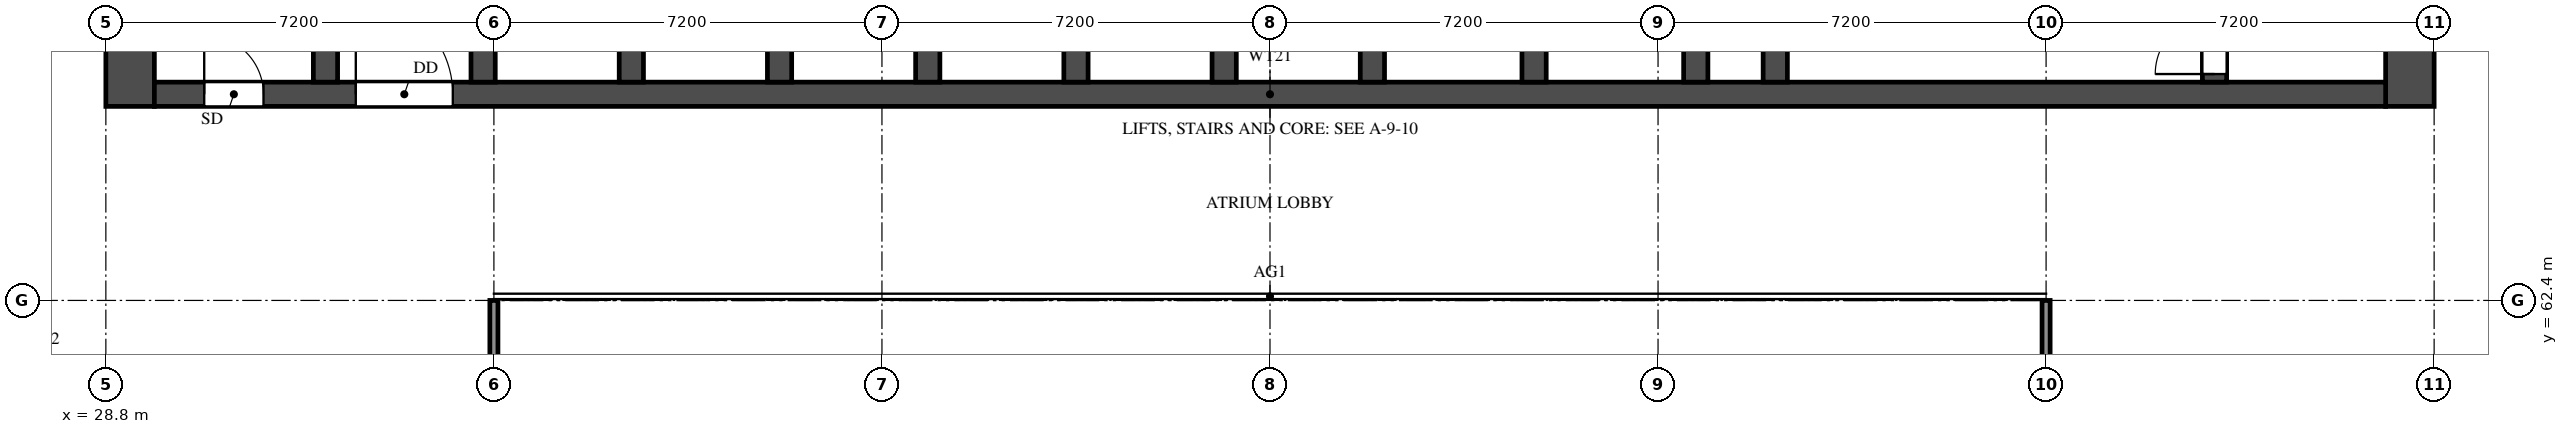
"""IFC4 building model, lengths in metres.
Left out: names, types, materials, properties, quantities, classifications, styles, units other than length and angle.
Written with IfcOpenShell. Run it as: python <this file> out.ifc"""

import sys

from ifc_helpers import new_model, si_unit, direction, frame, frame_2d, origin, place, context, subcontext, project, spatial, rectangle, extrude, element, fill, save


model = new_model("IFC4")
c1 = context("Model", 3, precision=1e-05, world=origin(), true_north=direction((0.0, 1.0)))
c2 = subcontext(c1, "Body", "Model", "MODEL_VIEW")
j1 = project(units=[si_unit("LENGTHUNIT", "METRE"), si_unit("PLANEANGLEUNIT", "RADIAN")], contexts=[c1])
p1 = place(None, origin())
s1 = spatial("IfcSite", under=j1, at=p1, CompositionType="ELEMENT")
p2 = place(p1, origin())
s2 = spatial("IfcBuilding", under=s1, at=p2, CompositionType="ELEMENT")
p3 = place(p2, frame((0.0, 0.0, 51.5)))
s3 = spatial("IfcBuildingStorey", under=s2, at=p3, CompositionType="ELEMENT", Elevation=51.5)
for number, where, z_axis, x_axis in (
    (1, (29.25, 66.0, 0.0), (0.0, 0.0, 1.0), (0.0, 1.0, 0.0)),
    (2, (71.55, 66.0, 0.0), (0.0, 0.0, 1.0), (0.0, 1.0, 0.0)),
):
    element("IfcWall", number, at=place(p3, frame(where, z_axis=z_axis, x_axis=x_axis)), inside=s3, PredefinedType="SHEAR", context=c2, shape_type="SweptSolid", body=[
        extrude(rectangle(XDim=12.0, YDim=0.9, at=frame_2d((6.0, 0.0))), origin(), (0.0, 0.0, 1.0), 3.18),
    ])
p4 = place(p3, frame((29.7, 66.225, 0.0), z_axis=(0.0, 0.0, 1.0), x_axis=(1.0, 0.0, 0.0)))
e3 = element("IfcWall", 3, at=p4, inside=s3, PredefinedType="SHEAR", context=c2, shape_type="SweptSolid", body=[
    extrude(rectangle(XDim=41.4, YDim=0.45, at=frame_2d((20.7, 0.0))), origin(), (0.0, 0.0, 1.0), 3.18),
])
p5 = place(p4, frame((0.925, 0.0, 0.0)))
e4 = element("IfcOpeningElement", 4, at=p5, cuts=e3, PredefinedType="OPENING", context=c2, shape_type="SweptSolid", body=[
    extrude(rectangle(XDim=1.1, YDim=2.1, at=frame_2d((0.55, 1.05))), frame((0.0, 0.235, 0.0), z_axis=(0.0, -1.0, 0.0), x_axis=(1.0, 0.0, 0.0)), (0.0, 0.0, 1.0), 0.47),
])
p6 = place(p4, frame((3.738, 0.0, 0.0)))
e5 = element("IfcOpeningElement", 5, at=p6, cuts=e3, PredefinedType="OPENING", context=c2, shape_type="SweptSolid", body=[
    extrude(rectangle(XDim=1.8, YDim=2.1, at=frame_2d((0.9, 1.05))), frame((0.0, 0.235, 0.0), z_axis=(0.0, -1.0, 0.0), x_axis=(1.0, 0.0, 0.0)), (0.0, 0.0, 1.0), 0.47),
])
p7 = place(p3, frame((32.875, 66.45, 0.0), z_axis=(0.0, 0.0, 1.0), x_axis=(0.0, 1.0, 0.0)))
e6 = element("IfcWall", 6, at=p7, inside=s3, PredefinedType="SHEAR", context=c2, shape_type="SweptSolid", body=[
    extrude(rectangle(XDim=10.65, YDim=0.45, at=frame_2d((5.325, 0.0))), origin(), (0.0, 0.0, 1.0), 3.18),
])
p8 = place(p3, frame((67.925, 66.45, 0.0), z_axis=(0.0, 0.0, 1.0), x_axis=(0.0, 1.0, 0.0)))
e7 = element("IfcWall", 7, at=p8, inside=s3, PredefinedType="SHEAR", context=c2, shape_type="SweptSolid", body=[
    extrude(rectangle(XDim=10.65, YDim=0.45, at=frame_2d((5.325, 0.0))), origin(), (0.0, 0.0, 1.0), 3.18),
])
p9 = place(p8, frame((0.15, 0.0, 0.0)))
e8 = element("IfcOpeningElement", 8, at=p9, cuts=e7, PredefinedType="OPENING", context=c2, shape_type="SweptSolid", body=[
    extrude(rectangle(XDim=1.1, YDim=2.1, at=frame_2d((0.55, 1.05))), frame((0.0, 0.235, 0.0), z_axis=(0.0, -1.0, 0.0), x_axis=(1.0, 0.0, 0.0)), (0.0, 0.0, 1.0), 0.47),
])
p10 = place(p3, frame((59.775, 66.45, 0.0), z_axis=(0.0, 0.0, 1.0), x_axis=(0.0, 1.0, 0.0)))
e9 = element("IfcWall", 9, at=p10, inside=s3, PredefinedType="SHEAR", context=c2, shape_type="SweptSolid", body=[
    extrude(rectangle(XDim=6.025, YDim=0.45, at=frame_2d((3.013, 0.0))), origin(), (0.0, 0.0, 1.0), 3.18),
])
p11 = place(p10, frame((3.85, 0.0, 0.0)))
e10 = element("IfcOpeningElement", 10, at=p11, cuts=e9, PredefinedType="OPENING", context=c2, shape_type="SweptSolid", body=[
    extrude(rectangle(XDim=1.2, YDim=2.1, at=frame_2d((0.6, 1.05))), frame((0.0, 0.235, 0.0), z_axis=(0.0, -1.0, 0.0), x_axis=(1.0, 0.0, 0.0)), (0.0, 0.0, 1.0), 0.47),
])
for number, where, z_axis, x_axis in (
    (11, (35.8, 66.45, 0.0), (0.0, 0.0, 1.0), (0.0, 1.0, 0.0)),
    (12, (38.55, 66.45, 0.0), (0.0, 0.0, 1.0), (0.0, 1.0, 0.0)),
    (13, (41.3, 66.45, 0.0), (0.0, 0.0, 1.0), (0.0, 1.0, 0.0)),
    (14, (44.05, 66.45, 0.0), (0.0, 0.0, 1.0), (0.0, 1.0, 0.0)),
    (15, (46.8, 66.45, 0.0), (0.0, 0.0, 1.0), (0.0, 1.0, 0.0)),
    (16, (49.55, 66.45, 0.0), (0.0, 0.0, 1.0), (0.0, 1.0, 0.0)),
    (17, (52.3, 66.45, 0.0), (0.0, 0.0, 1.0), (0.0, 1.0, 0.0)),
    (18, (55.3, 66.45, 0.0), (0.0, 0.0, 1.0), (0.0, 1.0, 0.0)),
    (19, (58.3, 66.45, 0.0), (0.0, 0.0, 1.0), (0.0, 1.0, 0.0)),
):
    element("IfcWall", number, at=place(p3, frame(where, z_axis=z_axis, x_axis=x_axis)), inside=s3, PredefinedType="SHEAR", context=c2, shape_type="SweptSolid", body=[
        extrude(rectangle(XDim=2.425, YDim=0.45, at=frame_2d((1.212, 0.0))), origin(), (0.0, 0.0, 1.0), 3.18),
    ])
for number, where, z_axis, x_axis in (
    (20, (36.0, 48.0, 0.0), (0.0, 0.0, 1.0), (0.0, 1.0, 0.0)),
    (21, (64.8, 48.0, 0.0), (0.0, 0.0, 1.0), (0.0, 1.0, 0.0)),
):
    element("IfcWall", number, at=place(p3, frame(where, z_axis=z_axis, x_axis=x_axis)), inside=s3, PredefinedType="SOLIDWALL", context=c2, shape_type="SweptSolid", body=[
        extrude(rectangle(XDim=14.4, YDim=0.15, at=frame_2d((7.2, 0.0))), origin(), (0.0, 0.0, 1.0), 2.28),
    ])
p12 = place(p5, origin())
e22 = element("IfcDoor", 22, at=p12, inside=s3, OperationType="SINGLE_SWING_LEFT", PredefinedType="DOOR", context=c2, shape_type="SweptSolid", body=[
    extrude(rectangle(XDim=1.1, YDim=2.1, at=frame_2d((0.55, 1.05))), frame((0.0, 0.025, 0.0), z_axis=(0.0, -1.0, 0.0), x_axis=(1.0, 0.0, 0.0)), (0.0, 0.0, 1.0), 0.05),
])
fill(e4, e22)
p13 = place(p9, origin())
e23 = element("IfcDoor", 23, at=p13, inside=s3, OperationType="SINGLE_SWING_LEFT", PredefinedType="DOOR", context=c2, shape_type="SweptSolid", body=[
    extrude(rectangle(XDim=1.1, YDim=2.1, at=frame_2d((0.55, 1.05))), frame((0.0, 0.025, 0.0), z_axis=(0.0, -1.0, 0.0), x_axis=(1.0, 0.0, 0.0)), (0.0, 0.0, 1.0), 0.05),
])
fill(e8, e23)
p14 = place(p6, origin())
e24 = element("IfcDoor", 24, at=p14, inside=s3, OperationType="DOUBLE_DOOR_SINGLE_SWING", PredefinedType="DOOR", context=c2, shape_type="SweptSolid", body=[
    extrude(rectangle(XDim=1.8, YDim=2.1, at=frame_2d((0.9, 1.05))), frame((0.0, 0.025, 0.0), z_axis=(0.0, -1.0, 0.0), x_axis=(1.0, 0.0, 0.0)), (0.0, 0.0, 1.0), 0.05),
])
fill(e5, e24)
save(model, sys.argv[1])
